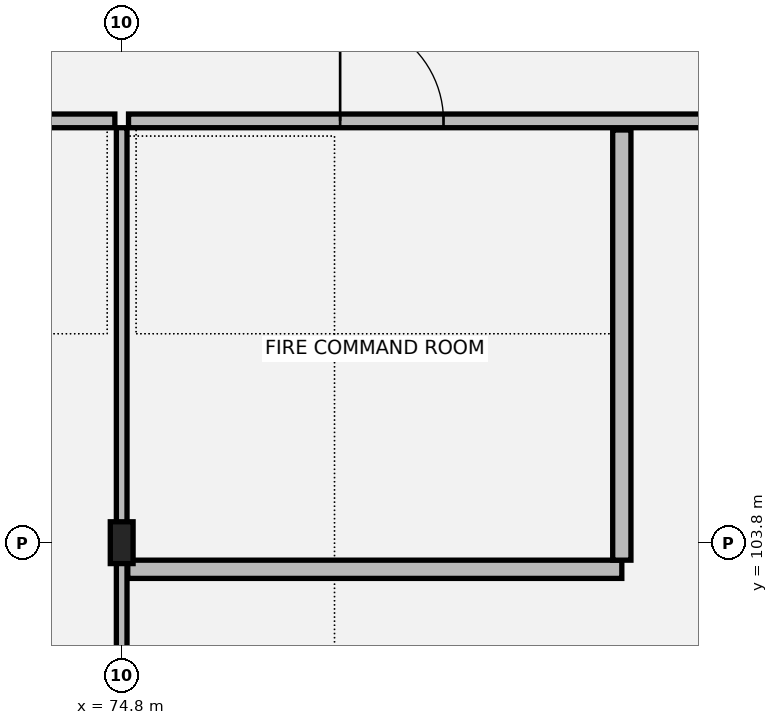
"""IFC4 building model, lengths in metres.
Left out: names, types, materials, properties, quantities, classifications, styles, units other than length and angle.
Written with IfcOpenShell. Run it as: python <this file> out.ifc"""

import sys

from ifc_helpers import new_model, si_unit, direction, frame, frame_2d, origin, origin_2d, place, context, subcontext, project, spatial, rectangle, i_section, extrude, element, fill, save


model = new_model("IFC4")
c1 = context("Model", 3, precision=1e-05, world=origin(), true_north=direction((0.0, 1.0)))
c2 = subcontext(c1, "Body", "Model", "MODEL_VIEW")
j1 = project(units=[si_unit("LENGTHUNIT", "METRE"), si_unit("PLANEANGLEUNIT", "RADIAN")], contexts=[c1])
p1 = place(None, origin())
s1 = spatial("IfcSite", under=j1, at=p1, CompositionType="ELEMENT")
p2 = place(p1, origin())
s2 = spatial("IfcBuilding", under=s1, at=p2, CompositionType="ELEMENT")
p3 = place(p2, origin())
s3 = spatial("IfcBuildingStorey", under=s2, at=p3, CompositionType="ELEMENT", Elevation=0.0)
p4 = place(p3, frame((74.8, 103.8, 0.0), z_axis=(0.0, 0.0, 1.0), x_axis=(1.0, 0.0, 0.0)))
e1 = element("IfcColumn", 1, at=p4, inside=s3, PredefinedType="COLUMN", context=c2, shape_type="SweptSolid", body=[
    extrude(i_section(OverallWidth=0.3, OverallDepth=0.55, WebThickness=0.015, FlangeThickness=0.029, at=origin_2d()), origin(), (0.0, 0.0, 1.0), 5.075),
])
p5 = place(p3, frame((66.6, 109.35, 0.0), z_axis=(0.0, 0.0, 1.0), x_axis=(1.0, 0.0, 0.0)))
e2 = element("IfcWall", 2, at=p5, inside=s3, PredefinedType="PARTITIONING", context=c2, shape_type="SweptSolid", body=[
    extrude(rectangle(XDim=8.11, YDim=0.18, at=frame_2d((4.055, 0.0))), origin(), (0.0, 0.0, 1.0), 4.2),
])
p6 = place(p5, frame((3.255, 0.0, 0.0)))
e3 = element("IfcOpeningElement", 3, at=p6, cuts=e2, PredefinedType="OPENING", context=c2, shape_type="SweptSolid", body=[
    extrude(rectangle(XDim=1.6, YDim=2.25, at=frame_2d((0.8, 1.125))), frame((0.0, 0.1, 0.0), z_axis=(0.0, -1.0, 0.0), x_axis=(1.0, 0.0, 0.0)), (0.0, 0.0, 1.0), 0.2),
])
p7 = place(p3, frame((74.89, 109.35, 0.0), z_axis=(0.0, 0.0, 1.0), x_axis=(1.0, 0.0, 0.0)))
e4 = element("IfcWall", 4, at=p7, inside=s3, PredefinedType="PARTITIONING", context=c2, shape_type="SweptSolid", body=[
    extrude(rectangle(XDim=8.22, YDim=0.18, at=frame_2d((4.11, 0.0))), origin(), (0.0, 0.0, 1.0), 4.2),
])
p8 = place(p7, frame((2.784, 0.0, 0.0)))
e5 = element("IfcOpeningElement", 5, at=p8, cuts=e4, PredefinedType="OPENING", context=c2, shape_type="SweptSolid", body=[
    extrude(rectangle(XDim=1.36, YDim=2.2, at=frame_2d((0.68, 1.1))), frame((0.0, 0.1, 0.0), z_axis=(0.0, -1.0, 0.0), x_axis=(1.0, 0.0, 0.0)), (0.0, 0.0, 1.0), 0.2),
])
p9 = place(p3, frame((74.8, 81.32, 0.0), z_axis=(0.0, 0.0, 1.0), x_axis=(0.0, 1.0, 0.0)))
e6 = element("IfcWall", 6, at=p9, inside=s3, PredefinedType="PARTITIONING", context=c2, shape_type="SweptSolid", body=[
    extrude(rectangle(XDim=27.94, YDim=0.14, at=frame_2d((13.97, 0.0))), origin(), (0.0, 0.0, 1.0), 4.2),
])
p10 = place(p9, frame((12.89, 0.0, 0.0)))
e7 = element("IfcOpeningElement", 7, at=p10, cuts=e6, PredefinedType="OPENING", context=c2, shape_type="SweptSolid", body=[
    extrude(rectangle(XDim=1.26, YDim=2.2, at=frame_2d((0.63, 1.1))), frame((0.0, 0.08, 0.0), z_axis=(0.0, -1.0, 0.0), x_axis=(1.0, 0.0, 0.0)), (0.0, 0.0, 1.0), 0.16),
])
p11 = place(p3, frame((74.88, 103.45, 0.0), z_axis=(0.0, 0.0, 1.0), x_axis=(1.0, 0.0, 0.0)))
e8 = element("IfcWall", 8, at=p11, inside=s3, PredefinedType="SOLIDWALL", context=c2, shape_type="SweptSolid", body=[
    extrude(rectangle(XDim=6.5, YDim=0.24, at=frame_2d((3.25, 0.0))), origin(), (0.0, 0.0, 1.0), 4.2),
])
p12 = place(p3, frame((81.38, 103.57, 0.0), z_axis=(0.0, 0.0, 1.0), x_axis=(0.0, 1.0, 0.0)))
e9 = element("IfcWall", 9, at=p12, inside=s3, PredefinedType="SOLIDWALL", context=c2, shape_type="SweptSolid", body=[
    extrude(rectangle(XDim=5.66, YDim=0.24, at=frame_2d((2.83, 0.0))), origin(), (0.0, 0.0, 1.0), 4.2),
])
p13 = place(p8, origin())
e10 = element("IfcDoor", 10, at=p13, inside=s3, OperationType="SINGLE_SWING_LEFT", PredefinedType="DOOR", context=c2, shape_type="SweptSolid", body=[
    extrude(rectangle(XDim=1.36, YDim=2.2, at=frame_2d((0.68, 1.1))), frame((0.0, 0.025, 0.0), z_axis=(0.0, -1.0, 0.0), x_axis=(1.0, 0.0, 0.0)), (0.0, 0.0, 1.0), 0.05),
])
fill(e5, e10)
save(model, sys.argv[1])
